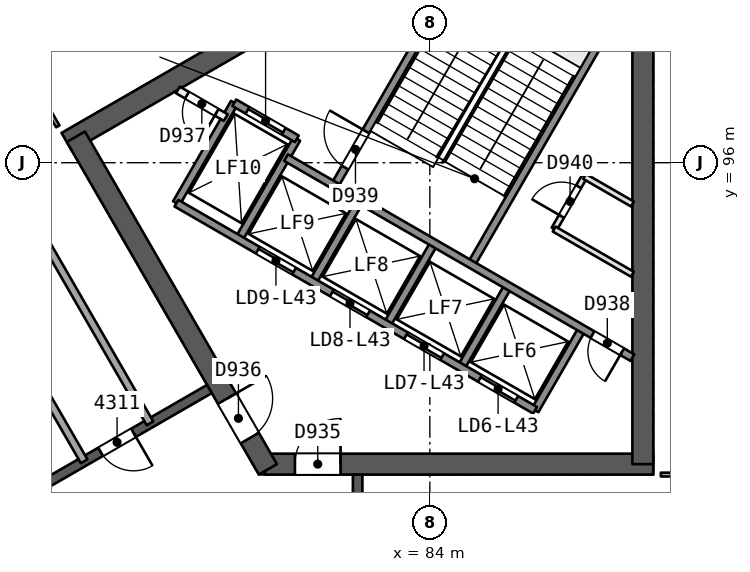
"""IFC4 building model, lengths in metres.
Left out: names, types, materials, properties, quantities, classifications, styles, units other than length and angle.
Written with IfcOpenShell. Run it as: python <this file> out.ifc"""

import sys

from ifc_helpers import new_model, si_unit, direction, frame, frame_2d, origin, place, context, subcontext, project, spatial, rectangle, extrude, element, fill, save


model = new_model("IFC4")
c1 = context("Model", 3, precision=1e-05, world=origin(), true_north=direction((0.0, 1.0)))
c2 = subcontext(c1, "Body", "Model", "MODEL_VIEW")
j1 = project(units=[si_unit("LENGTHUNIT", "METRE"), si_unit("PLANEANGLEUNIT", "RADIAN")], contexts=[c1])
p1 = place(None, origin())
s1 = spatial("IfcSite", under=j1, at=p1, CompositionType="ELEMENT")
p2 = place(p1, origin())
s2 = spatial("IfcBuilding", under=s1, at=p2, CompositionType="ELEMENT")
p3 = place(p2, frame((0.0, 0.0, 178.5)))
s3 = spatial("IfcBuildingStorey", under=s2, at=p3, CompositionType="ELEMENT", Elevation=178.5)
p4 = place(p3, frame((79.659, 88.069, 0.0), z_axis=(0.0, 0.0, 1.0), x_axis=(1.0, 0.0, 0.0)))
e1 = element("IfcWall", 1, at=p4, inside=s3, PredefinedType="SHEAR", context=c2, shape_type="SweptSolid", body=[
    extrude(rectangle(XDim=10.221, YDim=0.55, at=frame_2d((5.111, 0.0))), origin(), (0.0, 0.0, 1.0), 3.7),
])
p5 = place(p4, frame((0.791, 0.0, 0.0)))
e2 = element("IfcOpeningElement", 2, at=p5, cuts=e1, PredefinedType="OPENING", context=c2, shape_type="SweptSolid", body=[
    extrude(rectangle(XDim=1.2, YDim=2.1, at=frame_2d((0.6, 1.05))), frame((0.0, 0.286, 0.0), z_axis=(0.0, -1.0, 0.0), x_axis=(1.0, 0.0, 0.0)), (0.0, 0.0, 1.0), 0.571),
])
p6 = place(p3, frame((89.605, 88.069, 0.0), z_axis=(0.0, 0.0, 1.0), x_axis=(0.0, 1.0, 0.0)))
e3 = element("IfcWall", 3, at=p6, inside=s3, PredefinedType="SHEAR", context=c2, shape_type="SweptSolid", body=[
    extrude(rectangle(XDim=14.058, YDim=0.55, at=frame_2d((7.029, 0.0))), origin(), (0.0, 0.0, 1.0), 3.7),
])
p7 = place(p3, frame((86.723, 103.633, 0.0), z_axis=(0.0, 0.0, 1.0), x_axis=(-0.866023530946, -0.500003243837, 0.0)))
e4 = element("IfcWall", 4, at=p7, inside=s3, PredefinedType="SHEAR", context=c2, shape_type="SweptSolid", body=[
    extrude(rectangle(XDim=14.175, YDim=0.55, at=frame_2d((7.087, 0.0))), origin(), (0.0, 0.0, 1.0), 3.7),
])
p8 = place(p3, frame((74.686, 96.683, 0.0), z_axis=(0.0, 0.0, 1.0), x_axis=(0.499997818338, -0.866026663364, 0.0)))
e5 = element("IfcWall", 5, at=p8, inside=s3, PredefinedType="SHEAR", context=c2, shape_type="SweptSolid", body=[
    extrude(rectangle(XDim=10.105, YDim=0.55, at=frame_2d((5.052, 0.0))), origin(), (0.0, 0.0, 1.0), 3.7),
])
p9 = place(p8, frame((7.955, 0.0, 0.0)))
e6 = element("IfcOpeningElement", 6, at=p9, cuts=e5, PredefinedType="OPENING", context=c2, shape_type="SweptSolid", body=[
    extrude(rectangle(XDim=1.2, YDim=2.1, at=frame_2d((0.6, 1.05))), frame((0.0, 0.286, 0.0), z_axis=(0.0, -1.0, 0.0), x_axis=(1.0, 0.0, 0.0)), (0.0, 0.0, 1.0), 0.571),
])
p10 = place(p3, frame((82.1, 72.206, 0.0), z_axis=(0.0, 0.0, 1.0), x_axis=(0.0, 1.0, 0.0)))
e7 = element("IfcWall", 7, at=p10, inside=s3, PredefinedType="SHEAR", context=c2, shape_type="SweptSolid", body=[
    extrude(rectangle(XDim=15.588, YDim=0.25, at=frame_2d((7.794, 0.0))), origin(), (0.0, 0.0, 1.0), 3.25),
])
p11 = place(p10, frame((1.682, 0.0, 0.0)))
e8 = element("IfcOpeningElement", 8, at=p11, cuts=e7, PredefinedType="OPENING", context=c2, shape_type="SweptSolid", body=[
    extrude(rectangle(XDim=1.0, YDim=2.1, at=frame_2d((0.5, 1.05))), frame((0.0, 0.135, 0.0), z_axis=(0.0, -1.0, 0.0), x_axis=(1.0, 0.0, 0.0)), (0.0, 0.0, 1.0), 0.271),
])
p12 = place(p10, frame((8.75, 0.0, 0.0)))
e9 = element("IfcOpeningElement", 9, at=p12, cuts=e7, PredefinedType="OPENING", context=c2, shape_type="SweptSolid", body=[
    extrude(rectangle(XDim=1.0, YDim=2.1, at=frame_2d((0.5, 1.05))), frame((0.0, 0.135, 0.0), z_axis=(0.0, -1.0, 0.0), x_axis=(1.0, 0.0, 0.0)), (0.0, 0.0, 1.0), 0.271),
])
p13 = place(p10, frame((13.062, 0.0, 0.0)))
e10 = element("IfcOpeningElement", 10, at=p13, cuts=e7, PredefinedType="OPENING", context=c2, shape_type="SweptSolid", body=[
    extrude(rectangle(XDim=1.0, YDim=2.1, at=frame_2d((0.5, 1.05))), frame((0.0, 0.135, 0.0), z_axis=(0.0, -1.0, 0.0), x_axis=(1.0, 0.0, 0.0)), (0.0, 0.0, 1.0), 0.271),
])
p14 = place(p3, frame((78.2, 90.046, 0.0), z_axis=(0.0, 0.0, 1.0), x_axis=(-0.866026492143, -0.499998114903, 0.0)))
e11 = element("IfcWall", 11, at=p14, inside=s3, PredefinedType="SHEAR", context=c2, shape_type="SweptSolid", body=[
    extrude(rectangle(XDim=15.588, YDim=0.25, at=frame_2d((7.794, 0.0))), origin(), (0.0, 0.0, 1.0), 3.25),
])
p15 = place(p14, frame((2.306, 0.0, 0.0)))
e12 = element("IfcOpeningElement", 12, at=p15, cuts=e11, PredefinedType="OPENING", context=c2, shape_type="SweptSolid", body=[
    extrude(rectangle(XDim=1.0, YDim=2.1, at=frame_2d((0.5, 1.05))), frame((0.0, 0.135, 0.0), z_axis=(0.0, -1.0, 0.0), x_axis=(1.0, 0.0, 0.0)), (0.0, 0.0, 1.0), 0.271),
])
p16 = place(p14, frame((6.643, 0.0, 0.0)))
e13 = element("IfcOpeningElement", 13, at=p16, cuts=e11, PredefinedType="OPENING", context=c2, shape_type="SweptSolid", body=[
    extrude(rectangle(XDim=0.9, YDim=2.1, at=frame_2d((0.45, 1.05))), frame((0.0, 0.135, 0.0), z_axis=(0.0, -1.0, 0.0), x_axis=(1.0, 0.0, 0.0)), (0.0, 0.0, 1.0), 0.271),
])
p17 = place(p14, frame((9.604, 0.0, 0.0)))
e14 = element("IfcOpeningElement", 14, at=p17, cuts=e11, PredefinedType="OPENING", context=c2, shape_type="SweptSolid", body=[
    extrude(rectangle(XDim=0.9, YDim=2.1, at=frame_2d((0.45, 1.05))), frame((0.0, 0.135, 0.0), z_axis=(0.0, -1.0, 0.0), x_axis=(1.0, 0.0, 0.0)), (0.0, 0.0, 1.0), 0.271),
])
p18 = place(p14, frame((13.062, 0.0, 0.0)))
e15 = element("IfcOpeningElement", 15, at=p18, cuts=e11, PredefinedType="OPENING", context=c2, shape_type="SweptSolid", body=[
    extrude(rectangle(XDim=1.0, YDim=2.1, at=frame_2d((0.5, 1.05))), frame((0.0, 0.135, 0.0), z_axis=(0.0, -1.0, 0.0), x_axis=(1.0, 0.0, 0.0)), (0.0, 0.0, 1.0), 0.271),
])
p19 = place(p3, frame((93.353, 87.794, 0.0), z_axis=(0.0, 0.0, 1.0), x_axis=(-1.0, 0.0, 0.0)))
e16 = element("IfcWall", 16, at=p19, inside=s3, PredefinedType="PARTITIONING", context=c2, shape_type="SweptSolid", body=[
    extrude(rectangle(XDim=3.274, YDim=0.1, at=frame_2d((1.637, 0.0))), origin(), (0.0, 0.0, 1.0), 3.25),
])
p20 = place(p19, frame((1.187, 0.0, 0.0)))
e17 = element("IfcOpeningElement", 17, at=p20, cuts=e16, PredefinedType="OPENING", context=c2, shape_type="SweptSolid", body=[
    extrude(rectangle(XDim=0.9, YDim=2.1, at=frame_2d((0.45, 1.05))), frame((0.0, 0.061, 0.0), z_axis=(0.0, -1.0, 0.0), x_axis=(1.0, 0.0, 0.0)), (0.0, 0.0, 1.0), 0.121),
])
p21 = place(p3, frame((74.21, 96.956, 0.0), z_axis=(0.0, 0.0, 1.0), x_axis=(-0.499980647919, 0.866036576425, 0.0)))
e18 = element("IfcWall", 18, at=p21, inside=s3, PredefinedType="PARTITIONING", context=c2, shape_type="SweptSolid", body=[
    extrude(rectangle(XDim=3.274, YDim=0.1, at=frame_2d((1.637, 0.0))), origin(), (0.0, 0.0, 1.0), 3.25),
])
p22 = place(p21, frame((1.187, 0.0, 0.0)))
e19 = element("IfcOpeningElement", 19, at=p22, cuts=e18, PredefinedType="OPENING", context=c2, shape_type="SweptSolid", body=[
    extrude(rectangle(XDim=0.9, YDim=2.1, at=frame_2d((0.45, 1.05))), frame((0.0, 0.061, 0.0), z_axis=(0.0, -1.0, 0.0), x_axis=(1.0, 0.0, 0.0)), (0.0, 0.0, 1.0), 0.121),
])
p23 = place(p3, frame((74.904, 88.143, 0.0), z_axis=(0.0, 0.0, 1.0), x_axis=(-0.499990139034, 0.866031096941, 0.0)))
e20 = element("IfcWall", 20, at=p23, inside=s3, PredefinedType="PARTITIONING", context=c2, shape_type="SweptSolid", body=[
    extrude(rectangle(XDim=9.0, YDim=0.2, at=frame_2d((4.5, 0.0))), origin(), (0.0, 0.0, 1.0), 3.25),
])
p24 = place(p23, frame((4.05, 0.0, 0.0)))
e21 = element("IfcOpeningElement", 21, at=p24, cuts=e20, PredefinedType="OPENING", context=c2, shape_type="SweptSolid", body=[
    extrude(rectangle(XDim=0.9, YDim=2.1, at=frame_2d((0.45, 1.05))), frame((0.0, 0.11, 0.0), z_axis=(0.0, -1.0, 0.0), x_axis=(1.0, 0.0, 0.0)), (0.0, 0.0, 1.0), 0.221),
])
p25 = place(p3, frame((72.136, 96.937, 0.0), z_axis=(0.0, 0.0, 1.0), x_axis=(0.499990139034, -0.866031096941, 0.0)))
e22 = element("IfcWall", 22, at=p25, inside=s3, PredefinedType="PARTITIONING", context=c2, shape_type="SweptSolid", body=[
    extrude(rectangle(XDim=9.0, YDim=0.2, at=frame_2d((4.5, 0.0))), origin(), (0.0, 0.0, 1.0), 3.25),
])
p26 = place(p3, frame((42.71, 82.722, 0.0), z_axis=(0.0, 0.0, 1.0), x_axis=(0.866026647012, 0.499997846661, 0.0)))
e23 = element("IfcWall", 23, at=p26, inside=s3, PredefinedType="SOLIDWALL", context=c2, shape_type="SweptSolid", body=[
    extrude(rectangle(XDim=53.206, YDim=0.3, at=frame_2d((26.603, 0.0))), origin(), (0.0, 0.0, 1.0), 3.25),
])
p27 = place(p26, frame((30.391, 0.0, 0.0)))
e24 = element("IfcOpeningElement", 24, at=p27, cuts=e23, PredefinedType="OPENING", context=c2, shape_type="SweptSolid", body=[
    extrude(rectangle(XDim=2.4, YDim=2.4, at=frame_2d((1.2, 1.2))), frame((0.0, 0.161, 0.0), z_axis=(0.0, -1.0, 0.0), x_axis=(1.0, 0.0, 0.0)), (0.0, 0.0, 1.0), 0.321),
])
p28 = place(p26, frame((41.356, 0.0, 0.0)))
e25 = element("IfcOpeningElement", 25, at=p28, cuts=e23, PredefinedType="OPENING", context=c2, shape_type="SweptSolid", body=[
    extrude(rectangle(XDim=2.4, YDim=2.4, at=frame_2d((1.2, 1.2))), frame((0.0, 0.161, 0.0), z_axis=(0.0, -1.0, 0.0), x_axis=(1.0, 0.0, 0.0)), (0.0, 0.0, 1.0), 0.321),
])
p29 = place(p26, frame((19.635, 0.0, 0.0)))
e26 = element("IfcOpeningElement", 26, at=p29, cuts=e23, PredefinedType="OPENING", context=c2, shape_type="SweptSolid", body=[
    extrude(rectangle(XDim=2.4, YDim=2.4, at=frame_2d((1.2, 1.2))), frame((0.0, 0.161, 0.0), z_axis=(0.0, -1.0, 0.0), x_axis=(1.0, 0.0, 0.0)), (0.0, 0.0, 1.0), 0.321),
])
p30 = place(p26, frame((9.4, 0.0, 0.0)))
e27 = element("IfcOpeningElement", 27, at=p30, cuts=e23, PredefinedType="OPENING", context=c2, shape_type="SweptSolid", body=[
    extrude(rectangle(XDim=2.4, YDim=2.4, at=frame_2d((1.2, 1.2))), frame((0.0, 0.161, 0.0), z_axis=(0.0, -1.0, 0.0), x_axis=(1.0, 0.0, 0.0)), (0.0, 0.0, 1.0), 0.321),
])
p31 = place(p26, frame((26.404, 0.0, 0.9)))
e28 = element("IfcOpeningElement", 28, at=p31, cuts=e23, PredefinedType="OPENING", context=c2, shape_type="SweptSolid", body=[
    extrude(rectangle(XDim=1.8, YDim=1.5, at=frame_2d((0.9, 0.75))), frame((0.0, 0.161, 0.0), z_axis=(0.0, -1.0, 0.0), x_axis=(1.0, 0.0, 0.0)), (0.0, 0.0, 1.0), 0.321),
])
p32 = place(p26, frame((23.442, 0.0, 0.9)))
e29 = element("IfcOpeningElement", 29, at=p32, cuts=e23, PredefinedType="OPENING", context=c2, shape_type="SweptSolid", body=[
    extrude(rectangle(XDim=1.8, YDim=1.5, at=frame_2d((0.9, 0.75))), frame((0.0, 0.161, 0.0), z_axis=(0.0, -1.0, 0.0), x_axis=(1.0, 0.0, 0.0)), (0.0, 0.0, 1.0), 0.321),
])
p33 = place(p3, frame((86.77, 89.486, 0.0), z_axis=(0.0, 0.0, 1.0), x_axis=(0.499961042966, 0.86604789447, 0.0)))
e30 = element("IfcWall", 30, at=p33, inside=s3, PredefinedType="SOLIDWALL", context=c2, shape_type="SweptSolid", body=[
    extrude(rectangle(XDim=2.48, YDim=0.2, at=frame_2d((1.24, 0.0))), origin(), (0.0, 0.0, 1.0), 3.25),
])
p34 = place(p3, frame((87.271, 94.254, 0.0), z_axis=(0.0, 0.0, 1.0), x_axis=(0.499995408039, 0.866028054938, 0.0)))
e31 = element("IfcWall", 31, at=p34, inside=s3, PredefinedType="PARTITIONING", context=c2, shape_type="SweptSolid", body=[
    extrude(rectangle(XDim=1.6, YDim=0.15, at=frame_2d((0.8, 0.0))), origin(), (0.0, 0.0, 1.0), 3.25),
])
p35 = place(p34, frame((0.387, 0.0, 0.0)))
e32 = element("IfcOpeningElement", 32, at=p35, cuts=e31, PredefinedType="OPENING", context=c2, shape_type="SweptSolid", body=[
    extrude(rectangle(XDim=0.9, YDim=2.1, at=frame_2d((0.45, 1.05))), frame((0.0, 0.085, 0.0), z_axis=(0.0, -1.0, 0.0), x_axis=(1.0, 0.0, 0.0)), (0.0, 0.0, 1.0), 0.171),
])
p36 = place(p3, frame((84.821, 90.611, 0.0), z_axis=(0.0, 0.0, 1.0), x_axis=(0.499961042966, 0.86604789447, 0.0)))
e33 = element("IfcWall", 33, at=p36, inside=s3, PredefinedType="SOLIDWALL", context=c2, shape_type="SweptSolid", body=[
    extrude(rectangle(XDim=2.48, YDim=0.2, at=frame_2d((1.24, 0.0))), origin(), (0.0, 0.0, 1.0), 3.25),
])
p37 = place(p3, frame((85.087, 93.321, 0.0), z_axis=(0.0, 0.0, 1.0), x_axis=(0.500019787375, 0.866013979237, 0.0)))
e34 = element("IfcWall", 34, at=p37, inside=s3, PredefinedType="SOLIDWALL", context=c2, shape_type="SweptSolid", body=[
    extrude(rectangle(XDim=7.7, YDim=0.2, at=frame_2d((3.85, 0.0))), origin(), (0.0, 0.0, 1.0), 3.25),
])
for number, where, z_axis, x_axis in (
    (35, (82.873, 91.736, 0.0), (0.0, 0.0, 1.0), (0.5, 0.866, 0.0)),
    (36, (80.924, 92.861, 0.0), (0.0, 0.0, 1.0), (0.5, 0.866, 0.0)),
):
    element("IfcWall", number, at=place(p3, frame(where, z_axis=z_axis, x_axis=x_axis)), inside=s3, PredefinedType="SOLIDWALL", context=c2, shape_type="SweptSolid", body=[
        extrude(rectangle(XDim=2.48, YDim=0.2, at=frame_2d((1.24, 0.0))), origin(), (0.0, 0.0, 1.0), 3.25),
    ])
p38 = place(p3, frame((81.493, 95.396, 0.0), z_axis=(0.0, 0.0, 1.0), x_axis=(0.500006057782, 0.866021906294, 0.0)))
e37 = element("IfcWall", 37, at=p38, inside=s3, PredefinedType="SOLIDWALL", context=c2, shape_type="SweptSolid", body=[
    extrude(rectangle(XDim=7.7, YDim=0.2, at=frame_2d((3.85, 0.0))), origin(), (0.0, 0.0, 1.0), 3.25),
])
p39 = place(p38, frame((0.55, 0.0, 0.0)))
e38 = element("IfcOpeningElement", 38, at=p39, cuts=e37, PredefinedType="OPENING", context=c2, shape_type="SweptSolid", body=[
    extrude(rectangle(XDim=1.1, YDim=2.1, at=frame_2d((0.55, 1.05))), frame((0.0, 0.11, 0.0), z_axis=(0.0, -1.0, 0.0), x_axis=(1.0, 0.0, 0.0)), (0.0, 0.0, 1.0), 0.221),
])
for number, where, z_axis, x_axis in (
    (39, (78.976, 93.986, 0.0), (0.0, 0.0, 1.0), (0.5, 0.866, 0.0)),
    (40, (77.33, 94.936, 0.0), (0.0, 0.0, 1.0), (0.5, 0.866, 0.0)),
):
    element("IfcWall", number, at=place(p3, frame(where, z_axis=z_axis, x_axis=x_axis)), inside=s3, PredefinedType="SOLIDWALL", context=c2, shape_type="SweptSolid", body=[
        extrude(rectangle(XDim=3.05, YDim=0.2, at=frame_2d((1.525, 0.0))), origin(), (0.0, 0.0, 1.0), 3.25),
    ])
p40 = place(p3, frame((86.77, 89.486, 0.0), z_axis=(0.0, 0.0, 1.0), x_axis=(-0.86601811187, 0.500012629753, 0.0)))
e41 = element("IfcWall", 41, at=p40, inside=s3, PredefinedType="SOLIDWALL", context=c2, shape_type="SweptSolid", body=[
    extrude(rectangle(XDim=10.9, YDim=0.2, at=frame_2d((5.45, 0.0))), origin(), (0.0, 0.0, 1.0), 3.25),
])
p41 = place(p40, frame((0.575, 0.0, 0.0)))
e42 = element("IfcOpeningElement", 42, at=p41, cuts=e41, PredefinedType="OPENING", context=c2, shape_type="SweptSolid", body=[
    extrude(rectangle(XDim=1.1, YDim=2.1, at=frame_2d((0.55, 1.05))), frame((0.0, 0.11, 0.0), z_axis=(0.0, -1.0, 0.0), x_axis=(1.0, 0.0, 0.0)), (0.0, 0.0, 1.0), 0.221),
])
p42 = place(p40, frame((2.825, 0.0, 0.0)))
e43 = element("IfcOpeningElement", 43, at=p42, cuts=e41, PredefinedType="OPENING", context=c2, shape_type="SweptSolid", body=[
    extrude(rectangle(XDim=1.1, YDim=2.1, at=frame_2d((0.55, 1.05))), frame((0.0, 0.11, 0.0), z_axis=(0.0, -1.0, 0.0), x_axis=(1.0, 0.0, 0.0)), (0.0, 0.0, 1.0), 0.221),
])
p43 = place(p40, frame((5.075, 0.0, 0.0)))
e44 = element("IfcOpeningElement", 44, at=p43, cuts=e41, PredefinedType="OPENING", context=c2, shape_type="SweptSolid", body=[
    extrude(rectangle(XDim=1.1, YDim=2.1, at=frame_2d((0.55, 1.05))), frame((0.0, 0.11, 0.0), z_axis=(0.0, -1.0, 0.0), x_axis=(1.0, 0.0, 0.0)), (0.0, 0.0, 1.0), 0.221),
])
p44 = place(p40, frame((7.325, 0.0, 0.0)))
e45 = element("IfcOpeningElement", 45, at=p44, cuts=e41, PredefinedType="OPENING", context=c2, shape_type="SweptSolid", body=[
    extrude(rectangle(XDim=1.1, YDim=2.1, at=frame_2d((0.55, 1.05))), frame((0.0, 0.11, 0.0), z_axis=(0.0, -1.0, 0.0), x_axis=(1.0, 0.0, 0.0)), (0.0, 0.0, 1.0), 0.221),
])
p45 = place(p3, frame((89.33, 90.872, 0.0), z_axis=(0.0, 0.0, 1.0), x_axis=(-0.866027589512, 0.49999621419, 0.0)))
e46 = element("IfcWall", 46, at=p45, inside=s3, PredefinedType="SOLIDWALL", context=c2, shape_type="SweptSolid", body=[
    extrude(rectangle(XDim=10.524, YDim=0.2, at=frame_2d((5.262, 0.0))), origin(), (0.0, 0.0, 1.0), 3.25),
])
p46 = place(p45, frame((0.312, 0.0, 0.0)))
e47 = element("IfcOpeningElement", 47, at=p46, cuts=e46, PredefinedType="OPENING", context=c2, shape_type="SweptSolid", body=[
    extrude(rectangle(XDim=0.9, YDim=2.1, at=frame_2d((0.45, 1.05))), frame((0.0, 0.11, 0.0), z_axis=(0.0, -1.0, 0.0), x_axis=(1.0, 0.0, 0.0)), (0.0, 0.0, 1.0), 0.221),
])
p47 = place(p3, frame((78.63, 97.188, 0.0), z_axis=(0.0, 0.0, 1.0), x_axis=(-0.866003949776, 0.500037157592, 0.0)))
e48 = element("IfcWall", 48, at=p47, inside=s3, PredefinedType="PARTITIONING", context=c2, shape_type="SweptSolid", body=[
    extrude(rectangle(XDim=1.455, YDim=0.2, at=frame_2d((0.728, 0.0))), origin(), (0.0, 0.0, 1.0), 3.25),
])
p48 = place(p47, frame((0.278, 0.0, 0.0)))
e49 = element("IfcOpeningElement", 49, at=p48, cuts=e48, PredefinedType="OPENING", context=c2, shape_type="SweptSolid", body=[
    extrude(rectangle(XDim=0.9, YDim=2.1, at=frame_2d((0.45, 1.05))), frame((0.0, 0.11, 0.0), z_axis=(0.0, -1.0, 0.0), x_axis=(1.0, 0.0, 0.0)), (0.0, 0.0, 1.0), 0.221),
])
p49 = place(p3, frame((80.5, 96.627, 0.0), z_axis=(0.0, 0.0, 1.0), x_axis=(-0.86601224135, 0.500022797313, 0.0)))
e50 = element("IfcWall", 50, at=p49, inside=s3, PredefinedType="SOLIDWALL", context=c2, shape_type="SweptSolid", body=[
    extrude(rectangle(XDim=1.9, YDim=0.2, at=frame_2d((0.95, 0.0))), origin(), (0.0, 0.0, 1.0), 3.25),
])
p50 = place(p49, frame((0.4, 0.0, 0.0)))
e51 = element("IfcOpeningElement", 51, at=p50, cuts=e50, PredefinedType="OPENING", context=c2, shape_type="SweptSolid", body=[
    extrude(rectangle(XDim=1.1, YDim=2.1, at=frame_2d((0.55, 1.05))), frame((0.0, 0.11, 0.0), z_axis=(0.0, -1.0, 0.0), x_axis=(1.0, 0.0, 0.0)), (0.0, 0.0, 1.0), 0.221),
])
p51 = place(p3, frame((89.33, 93.065, 0.0), z_axis=(0.0, 0.0, 1.0), x_axis=(-0.866041951395, 0.499971337603, 0.0)))
e52 = element("IfcWall", 52, at=p51, inside=s3, PredefinedType="PARTITIONING", context=c2, shape_type="SweptSolid", body=[
    extrude(rectangle(XDim=2.378, YDim=0.15, at=frame_2d((1.189, 0.0))), origin(), (0.0, 0.0, 1.0), 3.25),
])
p52 = place(p3, frame((89.33, 94.913, 0.0), z_axis=(0.0, 0.0, 1.0), x_axis=(-0.865981433661, 0.500076150755, 0.0)))
e53 = element("IfcWall", 53, at=p52, inside=s3, PredefinedType="PARTITIONING", context=c2, shape_type="SweptSolid", body=[
    extrude(rectangle(XDim=1.454, YDim=0.15, at=frame_2d((0.727, 0.0))), origin(), (0.0, 0.0, 1.0), 3.25),
])
p53 = place(p15, origin())
e54 = element("IfcDoor", 54, at=p53, inside=s3, OperationType="SINGLE_SWING_LEFT", PredefinedType="NOTDEFINED", context=c2, shape_type="SweptSolid", body=[
    extrude(rectangle(XDim=1.0, YDim=2.1, at=frame_2d((0.5, 1.05))), frame((0.0, 0.025, 0.0), z_axis=(0.0, -1.0, 0.0), x_axis=(1.0, 0.0, 0.0)), (0.0, 0.0, 1.0), 0.05),
])
fill(e12, e54)
p54 = place(p5, origin())
e55 = element("IfcDoor", 55, at=p54, inside=s3, OperationType="SINGLE_SWING_RIGHT", PredefinedType="NOTDEFINED", context=c2, shape_type="SweptSolid", body=[
    extrude(rectangle(XDim=1.2, YDim=2.1, at=frame_2d((0.6, 1.05))), frame((0.0, 0.025, 0.0), z_axis=(0.0, -1.0, 0.0), x_axis=(1.0, 0.0, 0.0)), (0.0, 0.0, 1.0), 0.05),
])
fill(e2, e55)
p55 = place(p9, origin())
e56 = element("IfcDoor", 56, at=p55, inside=s3, OperationType="SINGLE_SWING_LEFT", PredefinedType="NOTDEFINED", context=c2, shape_type="SweptSolid", body=[
    extrude(rectangle(XDim=1.2, YDim=2.1, at=frame_2d((0.6, 1.05))), frame((0.0, 0.025, 0.0), z_axis=(0.0, -1.0, 0.0), x_axis=(1.0, 0.0, 0.0)), (0.0, 0.0, 1.0), 0.05),
])
fill(e6, e56)
p56 = place(p41, origin())
e57 = element("IfcDoor", 57, at=p56, inside=s3, OperationType="SLIDING_TO_RIGHT", PredefinedType="NOTDEFINED", context=c2, shape_type="SweptSolid", body=[
    extrude(rectangle(XDim=1.1, YDim=2.1, at=frame_2d((0.55, 1.05))), frame((0.0, 0.025, 0.0), z_axis=(0.0, -1.0, 0.0), x_axis=(1.0, 0.0, 0.0)), (0.0, 0.0, 1.0), 0.05),
])
fill(e42, e57)
p57 = place(p42, origin())
e58 = element("IfcDoor", 58, at=p57, inside=s3, OperationType="SLIDING_TO_LEFT", PredefinedType="NOTDEFINED", context=c2, shape_type="SweptSolid", body=[
    extrude(rectangle(XDim=1.1, YDim=2.1, at=frame_2d((0.55, 1.05))), frame((0.0, 0.025, 0.0), z_axis=(0.0, -1.0, 0.0), x_axis=(1.0, 0.0, 0.0)), (0.0, 0.0, 1.0), 0.05),
])
fill(e43, e58)
p58 = place(p43, origin())
e59 = element("IfcDoor", 59, at=p58, inside=s3, OperationType="SLIDING_TO_RIGHT", PredefinedType="NOTDEFINED", context=c2, shape_type="SweptSolid", body=[
    extrude(rectangle(XDim=1.1, YDim=2.1, at=frame_2d((0.55, 1.05))), frame((0.0, 0.025, 0.0), z_axis=(0.0, -1.0, 0.0), x_axis=(1.0, 0.0, 0.0)), (0.0, 0.0, 1.0), 0.05),
])
fill(e44, e59)
p59 = place(p44, origin())
e60 = element("IfcDoor", 60, at=p59, inside=s3, OperationType="SLIDING_TO_LEFT", PredefinedType="NOTDEFINED", context=c2, shape_type="SweptSolid", body=[
    extrude(rectangle(XDim=1.1, YDim=2.1, at=frame_2d((0.55, 1.05))), frame((0.0, 0.025, 0.0), z_axis=(0.0, -1.0, 0.0), x_axis=(1.0, 0.0, 0.0)), (0.0, 0.0, 1.0), 0.05),
])
fill(e45, e60)
p60 = place(p50, origin())
e61 = element("IfcDoor", 61, at=p60, inside=s3, OperationType="SLIDING_TO_RIGHT", PredefinedType="NOTDEFINED", context=c2, shape_type="SweptSolid", body=[
    extrude(rectangle(XDim=1.1, YDim=2.1, at=frame_2d((0.55, 1.05))), frame((0.0, 0.025, 0.0), z_axis=(0.0, -1.0, 0.0), x_axis=(1.0, 0.0, 0.0)), (0.0, 0.0, 1.0), 0.05),
])
fill(e51, e61)
p61 = place(p48, origin())
e62 = element("IfcDoor", 62, at=p61, inside=s3, OperationType="SINGLE_SWING_LEFT", PredefinedType="NOTDEFINED", context=c2, shape_type="SweptSolid", body=[
    extrude(rectangle(XDim=0.9, YDim=2.1, at=frame_2d((0.45, 1.05))), frame((0.0, 0.025, 0.0), z_axis=(0.0, -1.0, 0.0), x_axis=(1.0, 0.0, 0.0)), (0.0, 0.0, 1.0), 0.05),
])
fill(e49, e62)
p62 = place(p46, origin())
e63 = element("IfcDoor", 63, at=p62, inside=s3, OperationType="SINGLE_SWING_LEFT", PredefinedType="NOTDEFINED", context=c2, shape_type="SweptSolid", body=[
    extrude(rectangle(XDim=0.9, YDim=2.1, at=frame_2d((0.45, 1.05))), frame((0.0, 0.025, 0.0), z_axis=(0.0, -1.0, 0.0), x_axis=(1.0, 0.0, 0.0)), (0.0, 0.0, 1.0), 0.05),
])
fill(e47, e63)
p63 = place(p39, origin())
e64 = element("IfcDoor", 64, at=p63, inside=s3, OperationType="SINGLE_SWING_RIGHT", PredefinedType="NOTDEFINED", context=c2, shape_type="SweptSolid", body=[
    extrude(rectangle(XDim=1.1, YDim=2.1, at=frame_2d((0.55, 1.05))), frame((0.0, 0.025, 0.0), z_axis=(0.0, -1.0, 0.0), x_axis=(1.0, 0.0, 0.0)), (0.0, 0.0, 1.0), 0.05),
])
fill(e38, e64)
p64 = place(p35, origin())
e65 = element("IfcDoor", 65, at=p64, inside=s3, OperationType="SINGLE_SWING_LEFT", PredefinedType="NOTDEFINED", context=c2, shape_type="SweptSolid", body=[
    extrude(rectangle(XDim=0.9, YDim=2.1, at=frame_2d((0.45, 1.05))), frame((0.0, 0.025, 0.0), z_axis=(0.0, -1.0, 0.0), x_axis=(1.0, 0.0, 0.0)), (0.0, 0.0, 1.0), 0.05),
])
fill(e32, e65)
save(model, sys.argv[1])
